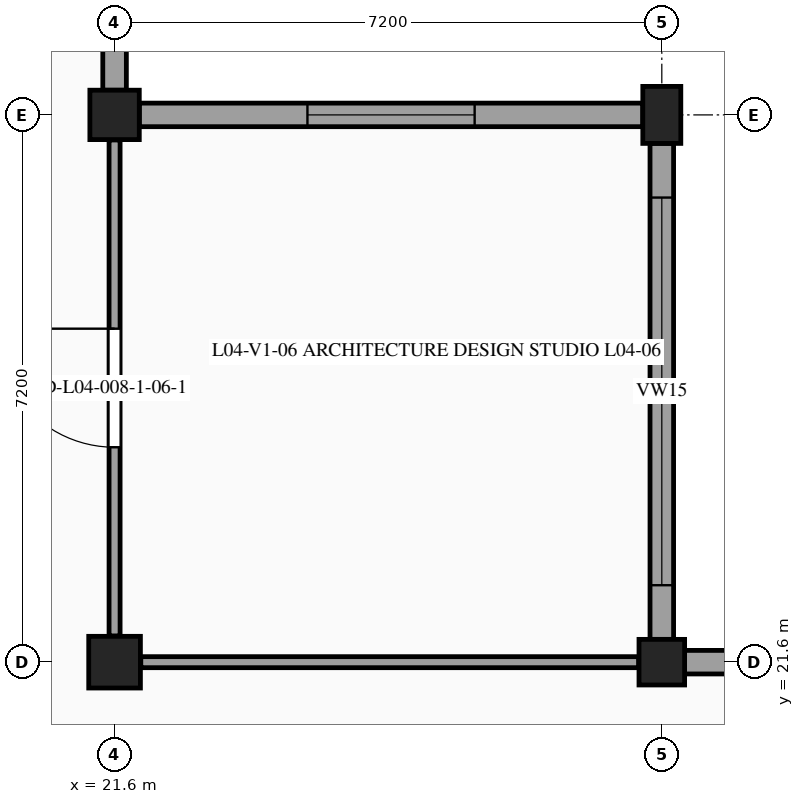
"""IFC4 building model, lengths in metres.
Left out: names, types, materials, properties, quantities, classifications, styles, units other than length and angle.
Written with IfcOpenShell. Run it as: python <this file> out.ifc"""

import sys

from ifc_helpers import new_model, si_unit, direction, frame, frame_2d, origin, origin_2d, place, context, subcontext, project, spatial, rectangle, extrude, element, fill, save


model = new_model("IFC4")
c1 = context("Model", 3, precision=1e-05, world=origin(), true_north=direction((0.0, 1.0)))
c2 = subcontext(c1, "Body", "Model", "MODEL_VIEW")
j1 = project(units=[si_unit("LENGTHUNIT", "METRE"), si_unit("PLANEANGLEUNIT", "RADIAN")], contexts=[c1])
p1 = place(None, origin())
s1 = spatial("IfcSite", under=j1, at=p1, CompositionType="ELEMENT")
p2 = place(p1, origin())
s2 = spatial("IfcBuilding", under=s1, at=p2, CompositionType="ELEMENT")
p3 = place(p2, frame((0.0, 0.0, 18.6)))
s3 = spatial("IfcBuildingStorey", under=s2, at=p3, CompositionType="ELEMENT", Elevation=18.6)
p4 = place(p3, frame((21.6, 21.6, 0.0), z_axis=(0.0, 0.0, 1.0), x_axis=(1.0, 0.0, 0.0)))
e1 = element("IfcColumn", 1, at=p4, inside=s3, PredefinedType="COLUMN", context=c2, shape_type="SweptSolid", body=[
    extrude(rectangle(XDim=0.68, YDim=0.68, at=origin_2d()), origin(), (0.0, 0.0, 1.0), 4.2),
])
p5 = place(p3, frame((21.6, 28.8, 0.0), z_axis=(0.0, 0.0, 1.0), x_axis=(1.0, 0.0, 0.0)))
e2 = element("IfcColumn", 2, at=p5, inside=s3, PredefinedType="COLUMN", context=c2, shape_type="SweptSolid", body=[
    extrude(rectangle(XDim=0.65, YDim=0.65, at=origin_2d()), origin(), (0.0, 0.0, 1.0), 4.2),
])
p6 = place(p3, frame((28.8, 21.6, 0.0), z_axis=(0.0, 0.0, 1.0), x_axis=(1.0, 0.0, 0.0)))
e3 = element("IfcColumn", 3, at=p6, inside=s3, PredefinedType="COLUMN", context=c2, shape_type="SweptSolid", body=[
    extrude(rectangle(XDim=0.6, YDim=0.6, at=origin_2d()), origin(), (0.0, 0.0, 1.0), 4.2),
])
p7 = place(p3, frame((28.8, 28.8, 0.0), z_axis=(0.0, 0.0, 1.0), x_axis=(1.0, 0.0, 0.0)))
e4 = element("IfcColumn", 4, at=p7, inside=s3, PredefinedType="COLUMN", context=c2, shape_type="SweptSolid", body=[
    extrude(rectangle(XDim=0.5, YDim=0.75, at=origin_2d()), origin(), (0.0, 0.0, 1.0), 4.2),
])
p8 = place(p3, frame((21.6, 35.69, 0.0), z_axis=(0.0, 0.0, 1.0), x_axis=(0.0, -1.0, 0.0)))
e5 = element("IfcWall", 5, at=p8, inside=s3, PredefinedType="STANDARD", context=c2, shape_type="SweptSolid", body=[
    extrude(rectangle(XDim=6.565, YDim=0.31, at=frame_2d((3.282, 0.0))), origin(), (0.0, 0.0, 1.0), 3.15),
])
p9 = place(p8, frame((1.982, 0.0, 0.98)))
e6 = element("IfcOpeningElement", 6, at=p9, cuts=e5, PredefinedType="OPENING", context=c2, shape_type="SweptSolid", body=[
    extrude(rectangle(XDim=2.6, YDim=1.5, at=frame_2d((1.3, 0.75))), frame((0.0, 0.165, 0.0), z_axis=(0.0, -1.0, 0.0), x_axis=(1.0, 0.0, 0.0)), (0.0, 0.0, 1.0), 0.33),
])
p10 = place(p3, frame((21.925, 28.8, 0.0), z_axis=(0.0, 0.0, 1.0), x_axis=(1.0, 0.0, 0.0)))
e7 = element("IfcWall", 7, at=p10, inside=s3, PredefinedType="STANDARD", context=c2, shape_type="SweptSolid", body=[
    extrude(rectangle(XDim=6.625, YDim=0.31, at=frame_2d((3.312, 0.0))), origin(), (0.0, 0.0, 1.0), 3.18),
])
p11 = place(p10, frame((2.212, 0.0, 0.98)))
e8 = element("IfcOpeningElement", 8, at=p11, cuts=e7, PredefinedType="OPENING", context=c2, shape_type="SweptSolid", body=[
    extrude(rectangle(XDim=2.2, YDim=1.45, at=frame_2d((1.1, 0.725))), frame((0.0, 0.165, 0.0), z_axis=(0.0, -1.0, 0.0), x_axis=(1.0, 0.0, 0.0)), (0.0, 0.0, 1.0), 0.33),
])
p12 = place(p3, frame((28.8, 28.425, 0.0), z_axis=(0.0, 0.0, 1.0), x_axis=(0.0, -1.0, 0.0)))
e9 = element("IfcWall", 9, at=p12, inside=s3, PredefinedType="STANDARD", context=c2, shape_type="SweptSolid", body=[
    extrude(rectangle(XDim=6.525, YDim=0.31, at=frame_2d((3.263, 0.0))), origin(), (0.0, 0.0, 1.0), 3.13),
])
p13 = place(p12, frame((0.712, 0.0, 0.98)))
e10 = element("IfcOpeningElement", 10, at=p13, cuts=e9, PredefinedType="OPENING", context=c2, shape_type="SweptSolid", body=[
    extrude(rectangle(XDim=5.1, YDim=1.75, at=frame_2d((2.55, 0.875))), frame((0.0, 0.165, 0.0), z_axis=(0.0, -1.0, 0.0), x_axis=(1.0, 0.0, 0.0)), (0.0, 0.0, 1.0), 0.33),
])
p14 = place(p3, frame((29.1, 21.6, 0.0), z_axis=(0.0, 0.0, 1.0), x_axis=(1.0, 0.0, 0.0)))
e11 = element("IfcWall", 11, at=p14, inside=s3, PredefinedType="STANDARD", context=c2, shape_type="SweptSolid", body=[
    extrude(rectangle(XDim=6.56, YDim=0.31, at=frame_2d((3.28, 0.0))), origin(), (0.0, 0.0, 1.0), 3.2),
])
p15 = place(p14, frame((1.08, 0.0, 0.98)))
e12 = element("IfcOpeningElement", 12, at=p15, cuts=e11, PredefinedType="OPENING", context=c2, shape_type="SweptSolid", body=[
    extrude(rectangle(XDim=4.4, YDim=1.65, at=frame_2d((2.2, 0.825))), frame((0.0, 0.165, 0.0), z_axis=(0.0, -1.0, 0.0), x_axis=(1.0, 0.0, 0.0)), (0.0, 0.0, 1.0), 0.33),
])
p16 = place(p3, frame((21.6, 21.945, 0.0), z_axis=(0.0, 0.0, 1.0), x_axis=(0.0, 1.0, 0.0)))
e13 = element("IfcWall", 13, at=p16, inside=s3, PredefinedType="PARTITIONING", context=c2, shape_type="SweptSolid", body=[
    extrude(rectangle(XDim=6.525, YDim=0.145, at=frame_2d((3.262, 0.0))), origin(), (0.0, 0.0, 1.0), 3.3),
])
p17 = place(p16, frame((2.482, 0.0, 0.0)))
e14 = element("IfcOpeningElement", 14, at=p17, cuts=e13, PredefinedType="OPENING", context=c2, shape_type="SweptSolid", body=[
    extrude(rectangle(XDim=1.56, YDim=2.25, at=frame_2d((0.78, 1.125))), frame((0.0, 0.083, 0.0), z_axis=(0.0, -1.0, 0.0), x_axis=(1.0, 0.0, 0.0)), (0.0, 0.0, 1.0), 0.165),
])
p18 = place(p3, frame((21.945, 21.6, 0.0), z_axis=(0.0, 0.0, 1.0), x_axis=(1.0, 0.0, 0.0)))
e15 = element("IfcWall", 15, at=p18, inside=s3, PredefinedType="PARTITIONING", context=c2, shape_type="SweptSolid", body=[
    extrude(rectangle(XDim=6.55, YDim=0.145, at=frame_2d((3.275, 0.0))), origin(), (0.0, 0.0, 1.0), 3.285),
])
p19 = place(p11, origin())
e16 = element("IfcWindow", 16, at=p19, inside=s3, PartitioningType="SINGLE_PANEL", PredefinedType="WINDOW", context=c2, shape_type="SweptSolid", body=[
    extrude(rectangle(XDim=2.2, YDim=1.45, at=frame_2d((1.1, 0.725))), frame((0.0, -0.03, 0.0), z_axis=(0.0, -1.0, 0.0), x_axis=(1.0, 0.0, 0.0)), (0.0, 0.0, 1.0), 0.06),
])
fill(e8, e16)
p20 = place(p13, origin())
e17 = element("IfcWindow", 17, at=p20, inside=s3, PartitioningType="SINGLE_PANEL", PredefinedType="WINDOW", context=c2, shape_type="SweptSolid", body=[
    extrude(rectangle(XDim=5.1, YDim=1.75, at=frame_2d((2.55, 0.875))), frame((0.0, -0.03, 0.0), z_axis=(0.0, -1.0, 0.0), x_axis=(1.0, 0.0, 0.0)), (0.0, 0.0, 1.0), 0.06),
])
fill(e10, e17)
p21 = place(p17, origin())
e18 = element("IfcDoor", 18, at=p21, inside=s3, OperationType="SINGLE_SWING_RIGHT", PredefinedType="DOOR", context=c2, shape_type="SweptSolid", body=[
    extrude(rectangle(XDim=1.56, YDim=2.25, at=frame_2d((0.78, 1.125))), frame((0.0, 0.025, 0.0), z_axis=(0.0, -1.0, 0.0), x_axis=(1.0, 0.0, 0.0)), (0.0, 0.0, 1.0), 0.05),
])
fill(e14, e18)
save(model, sys.argv[1])
